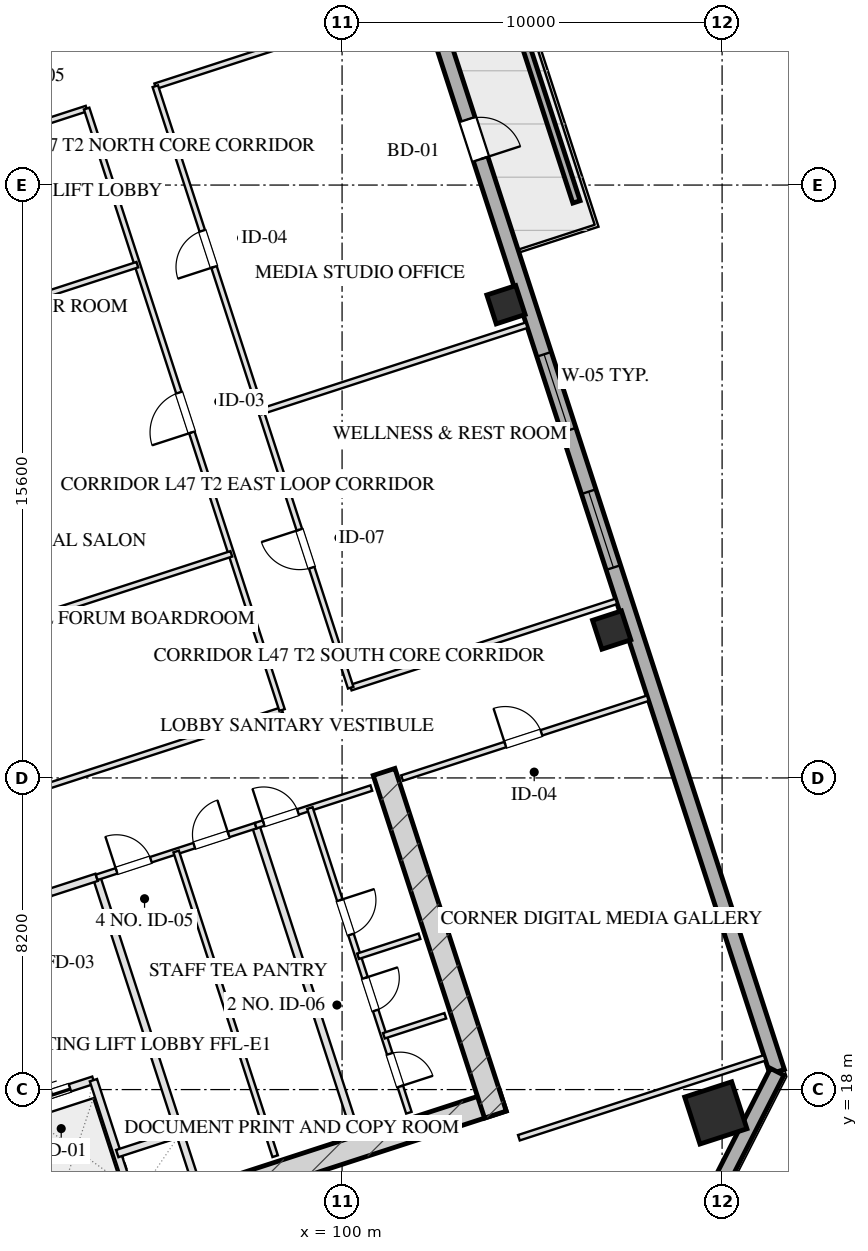
"""IFC4 building model, lengths in metres.
Left out: names, types, materials, properties, quantities, classifications, styles, units other than length and angle.
Written with IfcOpenShell. Run it as: python <this file> out.ifc"""

import sys

from ifc_helpers import new_model, si_unit, direction, frame, frame_2d, origin, origin_2d, place, context, subcontext, project, spatial, rectangle, hollow_rectangle, extrude, element, fill, save


model = new_model("IFC4")
c1 = context("Model", 3, precision=1e-05, world=origin(), true_north=direction((0.0, 1.0)))
c2 = subcontext(c1, "Body", "Model", "MODEL_VIEW")
j1 = project(units=[si_unit("LENGTHUNIT", "METRE"), si_unit("PLANEANGLEUNIT", "RADIAN")], contexts=[c1])
p1 = place(None, origin())
s1 = spatial("IfcSite", under=j1, at=p1, CompositionType="ELEMENT")
p2 = place(p1, origin())
s2 = spatial("IfcBuilding", under=s1, at=p2, CompositionType="ELEMENT")
p3 = place(p2, frame((0.0, 0.0, 177.1)))
s3 = spatial("IfcBuildingStorey", under=s2, at=p3, CompositionType="ELEMENT", Elevation=177.1)
p4 = place(p3, frame((88.63, 12.652, 0.0), z_axis=(0.0, 0.0, 1.0), x_axis=(0.95105714907, 0.309015046886, 0.0)))
e1 = element("IfcWall", 1, at=p4, inside=s3, PredefinedType="SHEAR", context=c2, shape_type="SweptSolid", body=[
    extrude(rectangle(XDim=16.4, YDim=0.6, at=frame_2d((8.2, 0.0))), origin(), (0.0, 0.0, 1.0), 3.45),
])
p5 = place(p3, frame((101.105, 26.358, 0.0), z_axis=(0.0, 0.0, 1.0), x_axis=(0.309010370028, -0.95105866865, 0.0)))
e2 = element("IfcWall", 2, at=p5, inside=s3, PredefinedType="SHEAR", context=c2, shape_type="SweptSolid", body=[
    extrude(rectangle(XDim=9.48, YDim=0.6, at=frame_2d((4.74, 0.0))), origin(), (0.0, 0.0, 1.0), 3.45),
])
p6 = place(p3, frame((90.486, 20.594, 0.0), z_axis=(0.0, 0.0, 1.0), x_axis=(0.309020428229, -0.951055400562, 0.0)))
e3 = element("IfcWall", 3, at=p6, inside=s3, PredefinedType="SHEAR", context=c2, shape_type="SweptSolid", body=[
    extrude(rectangle(XDim=6.98, YDim=0.35, at=frame_2d((3.49, 0.0))), origin(), (0.0, 0.0, 1.0), 3.45),
])
p7 = place(p3, frame((109.835, 17.386, 0.0), z_axis=(0.0, 0.0, 1.0), x_axis=(0.951056516295, 0.309016994375, 0.0)))
e4 = element("IfcColumn", 4, at=p7, inside=s3, PredefinedType="COLUMN", context=c2, shape_type="SweptSolid", body=[
    extrude(hollow_rectangle(XDim=1.3, YDim=1.3, WallThickness=0.045, at=origin_2d()), origin(), (0.0, 0.0, 1.0), 3.451),
])
for number, where, z_axis, x_axis in (
    (5, (107.094, 30.091, 0.0), (0.0, 0.0, 1.0), (0.951, 0.309, 0.0)),
    (6, (104.313, 38.651, 0.0), (0.0, 0.0, 1.0), (0.951, 0.309, 0.0)),
):
    element("IfcColumn", number, at=place(p3, frame(where, z_axis=z_axis, x_axis=x_axis)), inside=s3, PredefinedType="COLUMN", context=c2, shape_type="SweptSolid", body=[
        extrude(hollow_rectangle(XDim=0.8, YDim=0.8, WallThickness=0.028, at=origin_2d()), origin(), (0.0, 0.0, 1.0), 3.451),
    ])
p8 = place(p3, frame((98.224, 59.173, 0.0), z_axis=(0.0, 0.0, 1.0), x_axis=(0.309014228706, -0.951057414911, 0.0)))
e7 = element("IfcWall", 7, at=p8, inside=s3, PredefinedType="SOLIDWALL", context=c2, shape_type="SweptSolid", body=[
    extrude(rectangle(XDim=42.8, YDim=0.4, at=frame_2d((21.4, 0.0))), origin(), (0.0, 0.0, 1.0), 2.61),
])
p9 = place(p8, frame((26.75, 0.0, 0.75)))
e8 = element("IfcOpeningElement", 8, at=p9, cuts=e7, PredefinedType="OPENING", context=c2, shape_type="SweptSolid", body=[
    extrude(rectangle(XDim=2.1, YDim=1.46, at=frame_2d((1.05, 0.73))), frame((0.0, 0.21, 0.0), z_axis=(0.0, -1.0, 0.0), x_axis=(1.0, 0.0, 0.0)), (0.0, 0.0, 1.0), 0.42),
])
p10 = place(p8, frame((22.95, 0.0, 0.75)))
e9 = element("IfcOpeningElement", 9, at=p10, cuts=e7, PredefinedType="OPENING", context=c2, shape_type="SweptSolid", body=[
    extrude(rectangle(XDim=2.1, YDim=1.46, at=frame_2d((1.05, 0.73))), frame((0.0, 0.21, 0.0), z_axis=(0.0, -1.0, 0.0), x_axis=(1.0, 0.0, 0.0)), (0.0, 0.0, 1.0), 0.42),
])
p11 = place(p8, frame((16.45, 0.0, 0.0)))
e10 = element("IfcOpeningElement", 10, at=p11, cuts=e7, PredefinedType="OPENING", context=c2, shape_type="SweptSolid", body=[
    extrude(rectangle(XDim=1.1, YDim=2.15, at=frame_2d((0.55, 1.075))), frame((0.0, 0.21, 0.0), z_axis=(0.0, -1.0, 0.0), x_axis=(1.0, 0.0, 0.0)), (0.0, 0.0, 1.0), 0.42),
])
p12 = place(p3, frame((111.449, 18.468, 0.0), z_axis=(0.0, 0.0, 1.0), x_axis=(-0.454019523198, -0.890991735402, 0.0)))
e11 = element("IfcWall", 11, at=p12, inside=s3, PredefinedType="SOLIDWALL", context=c2, shape_type="SweptSolid", body=[
    extrude(rectangle(XDim=3.394, YDim=0.4, at=frame_2d((1.697, 0.0))), origin(), (0.0, 0.0, 1.0), 2.61),
])
p13 = place(p3, frame((106.168, 41.356, 0.0), z_axis=(0.0, 0.0, 1.0), x_axis=(-0.309032019345, 0.951051634255, 0.0)))
e12 = element("IfcWall", 12, at=p13, inside=s3, PredefinedType="PARAPET", context=c2, shape_type="SweptSolid", body=[
    extrude(rectangle(XDim=4.8, YDim=0.2, at=frame_2d((2.4, 0.0))), origin(), (0.0, 0.0, 1.0), 0.75),
])
p14 = place(p3, frame((93.542, 23.585, 0.0), z_axis=(0.0, 0.0, 1.0), x_axis=(0.309042196757, -0.951048327176, 0.0)))
e13 = element("IfcWall", 13, at=p14, inside=s3, PredefinedType="PARTITIONING", context=c2, shape_type="SweptSolid", body=[
    extrude(rectangle(XDim=8.43, YDim=0.2, at=frame_2d((4.215, 0.0))), origin(), (0.0, 0.0, 1.0), 3.175),
])
p15 = place(p3, frame((89.899, 22.401, 0.0), z_axis=(0.0, 0.0, 1.0), x_axis=(0.951046716504, 0.309047153403, 0.0)))
e14 = element("IfcWall", 14, at=p15, inside=s3, PredefinedType="PARTITIONING", context=c2, shape_type="SweptSolid", body=[
    extrude(rectangle(XDim=3.83, YDim=0.2, at=frame_2d((1.915, 0.0))), origin(), (0.0, 0.0, 1.0), 3.175),
])
p16 = place(p15, frame((1.35, 0.0, 0.0)))
e15 = element("IfcOpeningElement", 15, at=p16, cuts=e14, PredefinedType="OPENING", context=c2, shape_type="SweptSolid", body=[
    extrude(rectangle(XDim=1.2, YDim=2.05, at=frame_2d((0.6, 1.025))), frame((0.0, 0.11, 0.0), z_axis=(0.0, -1.0, 0.0), x_axis=(1.0, 0.0, 0.0)), (0.0, 0.0, 1.0), 0.22),
])
p17 = place(p3, frame((91.46, 17.598, 0.0), z_axis=(0.0, 0.0, 1.0), x_axis=(0.951062257173, 0.308999325213, 0.0)))
e16 = element("IfcWall", 16, at=p17, inside=s3, PredefinedType="PARTITIONING", context=c2, shape_type="SweptSolid", body=[
    extrude(rectangle(XDim=2.1, YDim=0.2, at=frame_2d((1.05, 0.0))), origin(), (0.0, 0.0, 1.0), 3.175),
])
p18 = place(p17, frame((0.35, 0.0, 0.0)))
e17 = element("IfcOpeningElement", 17, at=p18, cuts=e16, PredefinedType="OPENING", context=c2, shape_type="SweptSolid", body=[
    extrude(rectangle(XDim=1.1, YDim=2.05, at=frame_2d((0.55, 1.025))), frame((0.0, 0.11, 0.0), z_axis=(0.0, -1.0, 0.0), x_axis=(1.0, 0.0, 0.0)), (0.0, 0.0, 1.0), 0.22),
])
p19 = place(p3, frame((93.457, 18.247, 0.0), z_axis=(0.0, 0.0, 1.0), x_axis=(0.3089935693, -0.951064127245, 0.0)))
e18 = element("IfcWall", 18, at=p19, inside=s3, PredefinedType="PARTITIONING", context=c2, shape_type="SweptSolid", body=[
    extrude(rectangle(XDim=3.7, YDim=0.2, at=frame_2d((1.85, 0.0))), origin(), (0.0, 0.0, 1.0), 3.175),
])
p20 = place(p3, frame((94.084, 16.317, 0.0), z_axis=(0.0, 0.0, 1.0), x_axis=(0.951041328149, 0.309063734775, 0.0)))
e19 = element("IfcWall", 19, at=p20, inside=s3, PredefinedType="PARTITIONING", context=c2, shape_type="SweptSolid", body=[
    extrude(rectangle(XDim=1.73, YDim=0.2, at=frame_2d((0.865, 0.0))), origin(), (0.0, 0.0, 1.0), 3.175),
])
p21 = place(p3, frame((97.727, 24.944, 0.0), z_axis=(0.0, 0.0, 1.0), x_axis=(0.309016001439, -0.951056838919, 0.0)))
e20 = element("IfcWall", 20, at=p21, inside=s3, PredefinedType="PARTITIONING", context=c2, shape_type="SweptSolid", body=[
    extrude(rectangle(XDim=8.43, YDim=0.2, at=frame_2d((4.215, 0.0))), origin(), (0.0, 0.0, 1.0), 3.175),
])
p22 = place(p3, frame((93.542, 23.585, 0.0), z_axis=(0.0, 0.0, 1.0), x_axis=(0.951063829732, 0.308994485023, 0.0)))
e21 = element("IfcWall", 21, at=p22, inside=s3, PredefinedType="PARTITIONING", context=c2, shape_type="SweptSolid", body=[
    extrude(rectangle(XDim=4.4, YDim=0.15, at=frame_2d((2.2, 0.0))), origin(), (0.0, 0.0, 1.0), 3.175),
])
p23 = place(p22, frame((0.55, 0.0, 0.0)))
e22 = element("IfcOpeningElement", 22, at=p23, cuts=e21, PredefinedType="OPENING", context=c2, shape_type="SweptSolid", body=[
    extrude(rectangle(XDim=0.95, YDim=2.05, at=frame_2d((0.475, 1.025))), frame((0.0, 0.085, 0.0), z_axis=(0.0, -1.0, 0.0), x_axis=(1.0, 0.0, 0.0)), (0.0, 0.0, 1.0), 0.17),
])
p24 = place(p22, frame((2.7, 0.0, 0.0)))
e23 = element("IfcOpeningElement", 23, at=p24, cuts=e21, PredefinedType="OPENING", context=c2, shape_type="SweptSolid", body=[
    extrude(rectangle(XDim=0.95, YDim=2.05, at=frame_2d((0.475, 1.025))), frame((0.0, 0.085, 0.0), z_axis=(0.0, -1.0, 0.0), x_axis=(1.0, 0.0, 0.0)), (0.0, 0.0, 1.0), 0.17),
])
p25 = place(p3, frame((95.634, 24.265, 0.0), z_axis=(0.0, 0.0, 1.0), x_axis=(0.309007490203, -0.951059604335, 0.0)))
e24 = element("IfcWall", 24, at=p25, inside=s3, PredefinedType="PARTITIONING", context=c2, shape_type="SweptSolid", body=[
    extrude(rectangle(XDim=8.43, YDim=0.15, at=frame_2d((4.215, 0.0))), origin(), (0.0, 0.0, 1.0), 3.175),
])
p26 = place(p3, frame((97.727, 24.944, 0.0), z_axis=(0.0, 0.0, 1.0), x_axis=(0.951036872128, 0.309077446369, 0.0)))
e25 = element("IfcWall", 25, at=p26, inside=s3, PredefinedType="PARTITIONING", context=c2, shape_type="SweptSolid", body=[
    extrude(rectangle(XDim=3.2, YDim=0.15, at=frame_2d((1.6, 0.0))), origin(), (0.0, 0.0, 1.0), 3.175),
])
p27 = place(p26, frame((0.22, 0.0, 0.0)))
e26 = element("IfcOpeningElement", 26, at=p27, cuts=e25, PredefinedType="OPENING", context=c2, shape_type="SweptSolid", body=[
    extrude(rectangle(XDim=0.95, YDim=2.05, at=frame_2d((0.475, 1.025))), frame((0.0, 0.085, 0.0), z_axis=(0.0, -1.0, 0.0), x_axis=(1.0, 0.0, 0.0)), (0.0, 0.0, 1.0), 0.17),
])
p28 = place(p3, frame((99.153, 25.408, 0.0), z_axis=(0.0, 0.0, 1.0), x_axis=(0.309016001439, -0.951056838919, 0.0)))
e27 = element("IfcWall", 27, at=p28, inside=s3, PredefinedType="PARTITIONING", context=c2, shape_type="SweptSolid", body=[
    extrude(rectangle(XDim=8.43, YDim=0.15, at=frame_2d((4.215, 0.0))), origin(), (0.0, 0.0, 1.0), 3.175),
])
p29 = place(p28, frame((2.55, 0.0, 0.0)))
e28 = element("IfcOpeningElement", 28, at=p29, cuts=e27, PredefinedType="OPENING", context=c2, shape_type="SweptSolid", body=[
    extrude(rectangle(XDim=0.95, YDim=2.05, at=frame_2d((0.475, 1.025))), frame((0.0, 0.085, 0.0), z_axis=(0.0, -1.0, 0.0), x_axis=(1.0, 0.0, 0.0)), (0.0, 0.0, 1.0), 0.17),
])
p30 = place(p28, frame((4.7, 0.0, 0.0)))
e29 = element("IfcOpeningElement", 29, at=p30, cuts=e27, PredefinedType="OPENING", context=c2, shape_type="SweptSolid", body=[
    extrude(rectangle(XDim=0.9, YDim=2.05, at=frame_2d((0.45, 1.025))), frame((0.0, 0.085, 0.0), z_axis=(0.0, -1.0, 0.0), x_axis=(1.0, 0.0, 0.0)), (0.0, 0.0, 1.0), 0.17),
])
p31 = place(p28, frame((6.8, 0.0, 0.0)))
e30 = element("IfcOpeningElement", 30, at=p31, cuts=e27, PredefinedType="OPENING", context=c2, shape_type="SweptSolid", body=[
    extrude(rectangle(XDim=0.9, YDim=2.05, at=frame_2d((0.45, 1.025))), frame((0.0, 0.085, 0.0), z_axis=(0.0, -1.0, 0.0), x_axis=(1.0, 0.0, 0.0)), (0.0, 0.0, 1.0), 0.17),
])
p32 = place(p3, frame((100.42, 21.509, 0.0), z_axis=(0.0, 0.0, 1.0), x_axis=(0.951040401051, 0.309066587596, 0.0)))
e31 = element("IfcWall", 31, at=p32, inside=s3, PredefinedType="PARTITIONING", context=c2, shape_type="SweptSolid", body=[
    extrude(rectangle(XDim=1.7, YDim=0.15, at=frame_2d((0.85, 0.0))), origin(), (0.0, 0.0, 1.0), 3.175),
])
p33 = place(p3, frame((101.1, 19.416, 0.0), z_axis=(0.0, 0.0, 1.0), x_axis=(0.951054116971, 0.309024378638, 0.0)))
e32 = element("IfcWall", 32, at=p33, inside=s3, PredefinedType="PARTITIONING", context=c2, shape_type="SweptSolid", body=[
    extrude(rectangle(XDim=1.7, YDim=0.15, at=frame_2d((0.85, 0.0))), origin(), (0.0, 0.0, 1.0), 3.175),
])
p34 = place(p3, frame((104.653, 16.733, 0.0), z_axis=(0.0, 0.0, 1.0), x_axis=(0.951054383043, 0.309023559774, 0.0)))
e33 = element("IfcWall", 33, at=p34, inside=s3, PredefinedType="PARTITIONING", context=c2, shape_type="SweptSolid", body=[
    extrude(rectangle(XDim=6.8, YDim=0.15, at=frame_2d((3.4, 0.0))), origin(), (0.0, 0.0, 1.0), 3.175),
])
p35 = place(p3, frame((101.578, 26.196, 0.0), z_axis=(0.0, 0.0, 1.0), x_axis=(0.951064934653, 0.308991084134, 0.0)))
e34 = element("IfcWall", 34, at=p35, inside=s3, PredefinedType="PARTITIONING", context=c2, shape_type="SweptSolid", body=[
    extrude(rectangle(XDim=6.8, YDim=0.15, at=frame_2d((3.4, 0.0))), origin(), (0.0, 0.0, 1.0), 3.175),
])
p36 = place(p35, frame((2.856, 0.0, 0.0)))
e35 = element("IfcOpeningElement", 35, at=p36, cuts=e34, PredefinedType="OPENING", context=c2, shape_type="SweptSolid", body=[
    extrude(rectangle(XDim=1.0, YDim=2.05, at=frame_2d((0.5, 1.025))), frame((0.0, 0.085, 0.0), z_axis=(0.0, -1.0, 0.0), x_axis=(1.0, 0.0, 0.0)), (0.0, 0.0, 1.0), 0.17),
])
p37 = place(p3, frame((90.669, 25.469, 0.0), z_axis=(0.0, 0.0, 1.0), x_axis=(0.95106136293, 0.309002077568, 0.0)))
e36 = element("IfcWall", 36, at=p37, inside=s3, PredefinedType="PARTITIONING", context=c2, shape_type="SweptSolid", body=[
    extrude(rectangle(XDim=8.15, YDim=0.15, at=frame_2d((4.075, 0.0))), origin(), (0.0, 0.0, 1.0), 3.175),
])
p38 = place(p3, frame((100.227, 28.575, 0.0), z_axis=(0.0, 0.0, 1.0), x_axis=(0.95104773735, 0.309044011885, 0.0)))
e37 = element("IfcWall", 37, at=p38, inside=s3, PredefinedType="PARTITIONING", context=c2, shape_type="SweptSolid", body=[
    extrude(rectangle(XDim=7.35, YDim=0.15, at=frame_2d((3.675, 0.0))), origin(), (0.0, 0.0, 1.0), 3.175),
])
p39 = place(p3, frame((85.527, 41.295, 0.0), z_axis=(0.0, 0.0, 1.0), x_axis=(0.951055419664, 0.309020369437, 0.0)))
e38 = element("IfcWall", 38, at=p39, inside=s3, PredefinedType="PARTITIONING", context=c2, shape_type="SweptSolid", body=[
    extrude(rectangle(XDim=8.15, YDim=0.15, at=frame_2d((4.075, 0.0))), origin(), (0.0, 0.0, 1.0), 3.175),
])
p40 = place(p3, frame((95.085, 44.4, 0.0), z_axis=(0.0, 0.0, 1.0), x_axis=(0.95105749975, 0.309013967595, 0.0)))
e39 = element("IfcWall", 39, at=p40, inside=s3, PredefinedType="PARTITIONING", context=c2, shape_type="SweptSolid", body=[
    extrude(rectangle(XDim=7.35, YDim=0.15, at=frame_2d((3.675, 0.0))), origin(), (0.0, 0.0, 1.0), 3.175),
])
p41 = place(p3, frame((98.42, 27.988, 0.0), z_axis=(0.0, 0.0, 1.0), x_axis=(-0.309004459387, 0.951060589068, 0.0)))
e40 = element("IfcWall", 40, at=p41, inside=s3, PredefinedType="PARTITIONING", context=c2, shape_type="SweptSolid", body=[
    extrude(rectangle(XDim=16.64, YDim=0.15, at=frame_2d((8.32, 0.0))), origin(), (0.0, 0.0, 1.0), 3.175),
])
p42 = place(p41, frame((7.68, 0.0, 0.0)))
e41 = element("IfcOpeningElement", 41, at=p42, cuts=e40, PredefinedType="OPENING", context=c2, shape_type="SweptSolid", body=[
    extrude(rectangle(XDim=1.1, YDim=2.05, at=frame_2d((0.55, 1.025))), frame((0.0, 0.085, 0.0), z_axis=(0.0, -1.0, 0.0), x_axis=(1.0, 0.0, 0.0)), (0.0, 0.0, 1.0), 0.17),
])
p43 = place(p3, frame((100.227, 28.575, 0.0), z_axis=(0.0, 0.0, 1.0), x_axis=(-0.30901773025, 0.951056277195, 0.0)))
e42 = element("IfcWall", 42, at=p43, inside=s3, PredefinedType="PARTITIONING", context=c2, shape_type="SweptSolid", body=[
    extrude(rectangle(XDim=16.64, YDim=0.15, at=frame_2d((8.32, 0.0))), origin(), (0.0, 0.0, 1.0), 3.175),
])
p44 = place(p43, frame((3.32, 0.0, 0.0)))
e43 = element("IfcOpeningElement", 43, at=p44, cuts=e42, PredefinedType="OPENING", context=c2, shape_type="SweptSolid", body=[
    extrude(rectangle(XDim=1.05, YDim=2.05, at=frame_2d((0.525, 1.025))), frame((0.0, 0.085, 0.0), z_axis=(0.0, -1.0, 0.0), x_axis=(1.0, 0.0, 0.0)), (0.0, 0.0, 1.0), 0.17),
])
p45 = place(p43, frame((11.64, 0.0, 0.0)))
e44 = element("IfcOpeningElement", 44, at=p45, cuts=e42, PredefinedType="OPENING", context=c2, shape_type="SweptSolid", body=[
    extrude(rectangle(XDim=1.0, YDim=2.05, at=frame_2d((0.5, 1.025))), frame((0.0, 0.085, 0.0), z_axis=(0.0, -1.0, 0.0), x_axis=(1.0, 0.0, 0.0)), (0.0, 0.0, 1.0), 0.17),
])
p46 = place(p3, frame((89.334, 29.578, 0.0), z_axis=(0.0, 0.0, 1.0), x_axis=(0.951052558989, 0.309029173445, 0.0)))
e45 = element("IfcWall", 45, at=p46, inside=s3, PredefinedType="PARTITIONING", context=c2, shape_type="SweptSolid", body=[
    extrude(rectangle(XDim=8.15, YDim=0.15, at=frame_2d((4.075, 0.0))), origin(), (0.0, 0.0, 1.0), 3.175),
])
p47 = place(p3, frame((86.862, 37.186, 0.0), z_axis=(0.0, 0.0, 1.0), x_axis=(0.95106422313, 0.308993274169, 0.0)))
e46 = element("IfcWall", 46, at=p47, inside=s3, PredefinedType="PARTITIONING", context=c2, shape_type="SweptSolid", body=[
    extrude(rectangle(XDim=8.15, YDim=0.15, at=frame_2d((4.075, 0.0))), origin(), (0.0, 0.0, 1.0), 3.175),
])
p48 = place(p3, frame((97.866, 35.841, 0.0), z_axis=(0.0, 0.0, 1.0), x_axis=(0.95105749975, 0.309013967595, 0.0)))
e47 = element("IfcWall", 47, at=p48, inside=s3, PredefinedType="PARTITIONING", context=c2, shape_type="SweptSolid", body=[
    extrude(rectangle(XDim=7.35, YDim=0.15, at=frame_2d((3.675, 0.0))), origin(), (0.0, 0.0, 1.0), 3.175),
])
p49 = place(p9, origin())
e48 = element("IfcWindow", 48, at=p49, inside=s3, PartitioningType="TRIPLE_PANEL_VERTICAL", PredefinedType="WINDOW", context=c2, shape_type="SweptSolid", body=[
    extrude(rectangle(XDim=2.1, YDim=1.46, at=frame_2d((1.05, 0.73))), frame((0.0, 0.03, 0.0), z_axis=(0.0, -1.0, 0.0), x_axis=(1.0, 0.0, 0.0)), (0.0, 0.0, 1.0), 0.06),
])
fill(e8, e48)
p50 = place(p10, origin())
e49 = element("IfcWindow", 49, at=p50, inside=s3, PartitioningType="TRIPLE_PANEL_VERTICAL", PredefinedType="WINDOW", context=c2, shape_type="SweptSolid", body=[
    extrude(rectangle(XDim=2.1, YDim=1.46, at=frame_2d((1.05, 0.73))), frame((0.0, 0.03, 0.0), z_axis=(0.0, -1.0, 0.0), x_axis=(1.0, 0.0, 0.0)), (0.0, 0.0, 1.0), 0.06),
])
fill(e9, e49)
p51 = place(p11, origin())
e50 = element("IfcDoor", 50, at=p51, inside=s3, OperationType="SINGLE_SWING_RIGHT", PredefinedType="DOOR", context=c2, shape_type="SweptSolid", body=[
    extrude(rectangle(XDim=1.1, YDim=2.15, at=frame_2d((0.55, 1.075))), frame((0.0, 0.025, 0.0), z_axis=(0.0, -1.0, 0.0), x_axis=(1.0, 0.0, 0.0)), (0.0, 0.0, 1.0), 0.05),
])
fill(e10, e50)
p52 = place(p18, origin())
e51 = element("IfcDoor", 51, at=p52, inside=s3, OperationType="DOUBLE_DOOR_SLIDING", PredefinedType="DOOR", context=c2, shape_type="SweptSolid", body=[
    extrude(rectangle(XDim=1.1, YDim=2.05, at=frame_2d((0.55, 1.025))), frame((0.0, 0.025, 0.0), z_axis=(0.0, -1.0, 0.0), x_axis=(1.0, 0.0, 0.0)), (0.0, 0.0, 1.0), 0.05),
])
fill(e17, e51)
p53 = place(p23, origin())
e52 = element("IfcDoor", 52, at=p53, inside=s3, OperationType="SINGLE_SWING_LEFT", PredefinedType="DOOR", context=c2, shape_type="SweptSolid", body=[
    extrude(rectangle(XDim=0.95, YDim=2.05, at=frame_2d((0.475, 1.025))), frame((0.0, 0.025, 0.0), z_axis=(0.0, -1.0, 0.0), x_axis=(1.0, 0.0, 0.0)), (0.0, 0.0, 1.0), 0.05),
])
fill(e22, e52)
p54 = place(p24, origin())
e53 = element("IfcDoor", 53, at=p54, inside=s3, OperationType="SINGLE_SWING_RIGHT", PredefinedType="DOOR", context=c2, shape_type="SweptSolid", body=[
    extrude(rectangle(XDim=0.95, YDim=2.05, at=frame_2d((0.475, 1.025))), frame((0.0, 0.025, 0.0), z_axis=(0.0, -1.0, 0.0), x_axis=(1.0, 0.0, 0.0)), (0.0, 0.0, 1.0), 0.05),
])
fill(e23, e53)
p55 = place(p27, origin())
e54 = element("IfcDoor", 54, at=p55, inside=s3, OperationType="SINGLE_SWING_LEFT", PredefinedType="DOOR", context=c2, shape_type="SweptSolid", body=[
    extrude(rectangle(XDim=0.95, YDim=2.05, at=frame_2d((0.475, 1.025))), frame((0.0, 0.025, 0.0), z_axis=(0.0, -1.0, 0.0), x_axis=(1.0, 0.0, 0.0)), (0.0, 0.0, 1.0), 0.05),
])
fill(e26, e54)
p56 = place(p29, origin())
e55 = element("IfcDoor", 55, at=p56, inside=s3, OperationType="SINGLE_SWING_LEFT", PredefinedType="DOOR", context=c2, shape_type="SweptSolid", body=[
    extrude(rectangle(XDim=0.95, YDim=2.05, at=frame_2d((0.475, 1.025))), frame((0.0, 0.025, 0.0), z_axis=(0.0, -1.0, 0.0), x_axis=(1.0, 0.0, 0.0)), (0.0, 0.0, 1.0), 0.05),
])
fill(e28, e55)
p57 = place(p30, origin())
e56 = element("IfcDoor", 56, at=p57, inside=s3, OperationType="SINGLE_SWING_LEFT", PredefinedType="DOOR", context=c2, shape_type="SweptSolid", body=[
    extrude(rectangle(XDim=0.9, YDim=2.05, at=frame_2d((0.45, 1.025))), frame((0.0, 0.025, 0.0), z_axis=(0.0, -1.0, 0.0), x_axis=(1.0, 0.0, 0.0)), (0.0, 0.0, 1.0), 0.05),
])
fill(e29, e56)
p58 = place(p31, origin())
e57 = element("IfcDoor", 57, at=p58, inside=s3, OperationType="SINGLE_SWING_RIGHT", PredefinedType="DOOR", context=c2, shape_type="SweptSolid", body=[
    extrude(rectangle(XDim=0.9, YDim=2.05, at=frame_2d((0.45, 1.025))), frame((0.0, 0.025, 0.0), z_axis=(0.0, -1.0, 0.0), x_axis=(1.0, 0.0, 0.0)), (0.0, 0.0, 1.0), 0.05),
])
fill(e30, e57)
p59 = place(p36, origin())
e58 = element("IfcDoor", 58, at=p59, inside=s3, OperationType="SINGLE_SWING_LEFT", PredefinedType="DOOR", context=c2, shape_type="SweptSolid", body=[
    extrude(rectangle(XDim=1.0, YDim=2.05, at=frame_2d((0.5, 1.025))), frame((0.0, 0.025, 0.0), z_axis=(0.0, -1.0, 0.0), x_axis=(1.0, 0.0, 0.0)), (0.0, 0.0, 1.0), 0.05),
])
fill(e35, e58)
p60 = place(p42, origin())
e59 = element("IfcDoor", 59, at=p60, inside=s3, OperationType="SINGLE_SWING_LEFT", PredefinedType="DOOR", context=c2, shape_type="SweptSolid", body=[
    extrude(rectangle(XDim=1.1, YDim=2.05, at=frame_2d((0.55, 1.025))), frame((0.0, 0.025, 0.0), z_axis=(0.0, -1.0, 0.0), x_axis=(1.0, 0.0, 0.0)), (0.0, 0.0, 1.0), 0.05),
])
fill(e41, e59)
p61 = place(p44, origin())
e60 = element("IfcDoor", 60, at=p61, inside=s3, OperationType="SINGLE_SWING_RIGHT", PredefinedType="DOOR", context=c2, shape_type="SweptSolid", body=[
    extrude(rectangle(XDim=1.05, YDim=2.05, at=frame_2d((0.525, 1.025))), frame((0.0, 0.025, 0.0), z_axis=(0.0, -1.0, 0.0), x_axis=(1.0, 0.0, 0.0)), (0.0, 0.0, 1.0), 0.05),
])
fill(e43, e60)
p62 = place(p45, origin())
e61 = element("IfcDoor", 61, at=p62, inside=s3, OperationType="SINGLE_SWING_LEFT", PredefinedType="DOOR", context=c2, shape_type="SweptSolid", body=[
    extrude(rectangle(XDim=1.0, YDim=2.05, at=frame_2d((0.5, 1.025))), frame((0.0, 0.025, 0.0), z_axis=(0.0, -1.0, 0.0), x_axis=(1.0, 0.0, 0.0)), (0.0, 0.0, 1.0), 0.05),
])
fill(e44, e61)
save(model, sys.argv[1])
